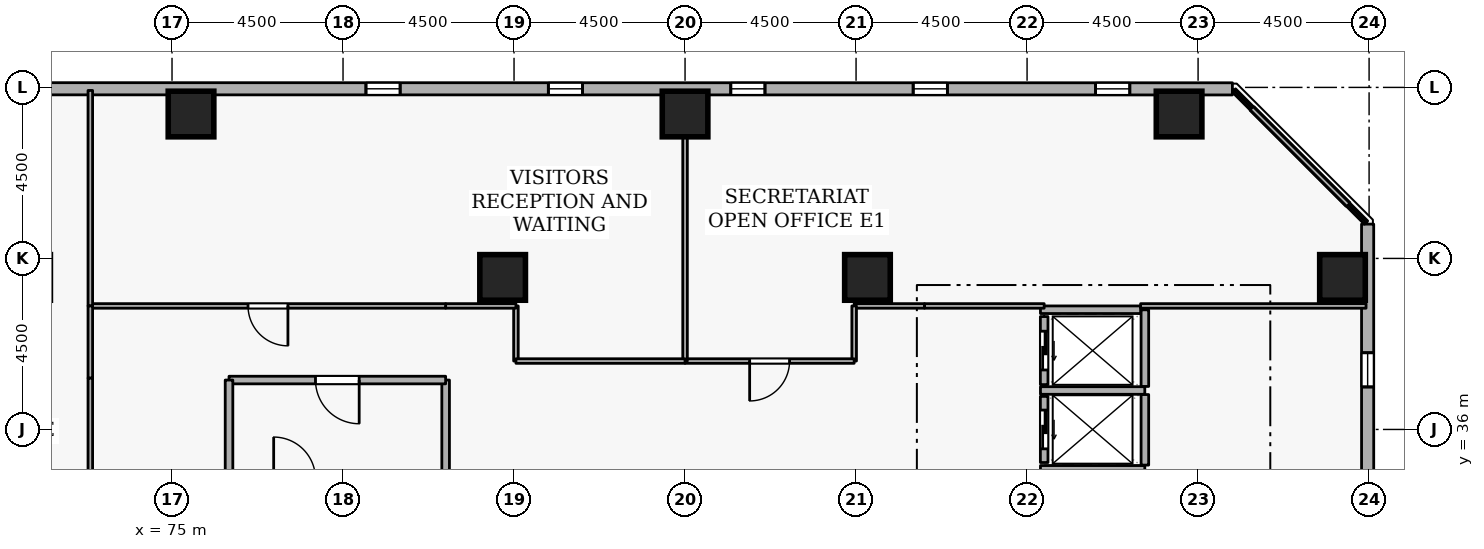
"""IFC4 building model, lengths in metres.
Left out: names, types, materials, properties, quantities, classifications, styles, units other than length and angle.
Written with IfcOpenShell. Run it as: python <this file> out.ifc"""

import sys

from ifc_helpers import new_model, si_unit, direction, frame, frame_2d, origin, origin_2d, place, context, subcontext, project, spatial, rectangle, extrude, element, fill, save


model = new_model("IFC4")
c1 = context("Model", 3, precision=1e-05, world=origin(), true_north=direction((0.0, 1.0)))
c2 = subcontext(c1, "Body", "Model", "MODEL_VIEW")
j1 = project(units=[si_unit("LENGTHUNIT", "METRE"), si_unit("PLANEANGLEUNIT", "RADIAN")], contexts=[c1])
p1 = place(None, origin())
s1 = spatial("IfcSite", under=j1, at=p1, CompositionType="ELEMENT")
p2 = place(p1, origin())
s2 = spatial("IfcBuilding", under=s1, at=p2, CompositionType="ELEMENT")
p3 = place(p2, frame((0.0, 0.0, 105.3)))
s3 = spatial("IfcBuildingStorey", under=s2, at=p3, CompositionType="ELEMENT", Elevation=105.3)
for number, where, z_axis, x_axis in (
    (1, (105.8, 40.0, 0.0), (0.0, 0.0, 1.0), (1.0, 0.0, 0.0)),
    (2, (101.5, 44.3, 0.0), (0.0, 0.0, 1.0), (1.0, 0.0, 0.0)),
    (3, (88.5, 44.3, 0.0), (0.0, 0.0, 1.0), (1.0, 0.0, 0.0)),
    (4, (75.5, 44.3, 0.0), (0.0, 0.0, 1.0), (1.0, 0.0, 0.0)),
    (5, (93.3, 40.0, 0.0), (0.0, 0.0, 1.0), (1.0, 0.0, 0.0)),
    (6, (83.7, 40.0, 0.0), (0.0, 0.0, 1.0), (1.0, 0.0, 0.0)),
):
    element("IfcColumn", number, at=place(p3, frame(where, z_axis=z_axis, x_axis=x_axis)), inside=s3, PredefinedType="COLUMN", context=c2, shape_type="SweptSolid", body=[
        extrude(rectangle(XDim=1.2, YDim=1.2, at=origin_2d()), origin(), (0.0, 0.0, 1.0), 3.6),
    ])
p4 = place(p3, frame((106.465, 5.619, 0.0), z_axis=(0.0, 0.0, 1.0), x_axis=(-8.8693006e-05, 0.999999996067, 0.0)))
e7 = element("IfcWall", 7, at=p4, inside=s3, PredefinedType="STANDARD", context=c2, shape_type="SweptSolid", body=[
    extrude(rectangle(XDim=35.784, YDim=0.32, at=frame_2d((17.892, 0.0))), origin(), (0.0, 0.0, 1.0), 2.7),
])
p5 = place(p4, frame((2.7, 0.0, 0.72)))
e8 = element("IfcOpeningElement", 8, at=p5, cuts=e7, PredefinedType="OPENING", context=c2, shape_type="SweptSolid", body=[
    extrude(rectangle(XDim=0.9, YDim=1.75, at=frame_2d((0.45, 0.875))), frame((0.0, 0.17, 0.0), z_axis=(0.0, -1.0, 0.0), x_axis=(1.0, 0.0, 0.0)), (0.0, 0.0, 1.0), 0.34),
])
p6 = place(p4, frame((12.3, 0.0, 0.72)))
e9 = element("IfcOpeningElement", 9, at=p6, cuts=e7, PredefinedType="OPENING", context=c2, shape_type="SweptSolid", body=[
    extrude(rectangle(XDim=0.9, YDim=1.75, at=frame_2d((0.45, 0.875))), frame((0.0, 0.17, 0.0), z_axis=(0.0, -1.0, 0.0), x_axis=(1.0, 0.0, 0.0)), (0.0, 0.0, 1.0), 0.34),
])
p7 = place(p4, frame((17.1, 0.0, 0.72)))
e10 = element("IfcOpeningElement", 10, at=p7, cuts=e7, PredefinedType="OPENING", context=c2, shape_type="SweptSolid", body=[
    extrude(rectangle(XDim=0.9, YDim=1.75, at=frame_2d((0.45, 0.875))), frame((0.0, 0.17, 0.0), z_axis=(0.0, -1.0, 0.0), x_axis=(1.0, 0.0, 0.0)), (0.0, 0.0, 1.0), 0.34),
])
p8 = place(p4, frame((26.7, 0.0, 0.72)))
e11 = element("IfcOpeningElement", 11, at=p8, cuts=e7, PredefinedType="OPENING", context=c2, shape_type="SweptSolid", body=[
    extrude(rectangle(XDim=0.9, YDim=1.75, at=frame_2d((0.45, 0.875))), frame((0.0, 0.17, 0.0), z_axis=(0.0, -1.0, 0.0), x_axis=(1.0, 0.0, 0.0)), (0.0, 0.0, 1.0), 0.34),
])
p9 = place(p4, frame((31.5, 0.0, 0.72)))
e12 = element("IfcOpeningElement", 12, at=p9, cuts=e7, PredefinedType="OPENING", context=c2, shape_type="SweptSolid", body=[
    extrude(rectangle(XDim=0.9, YDim=1.75, at=frame_2d((0.45, 0.875))), frame((0.0, 0.17, 0.0), z_axis=(0.0, -1.0, 0.0), x_axis=(1.0, 0.0, 0.0)), (0.0, 0.0, 1.0), 0.34),
])
p10 = place(p3, frame((102.903, 44.961, 0.0), z_axis=(0.0, 0.0, 1.0), x_axis=(-0.999999996067, 8.8693006e-05, 0.0)))
e13 = element("IfcWall", 13, at=p10, inside=s3, PredefinedType="STANDARD", context=c2, shape_type="SweptSolid", body=[
    extrude(rectangle(XDim=35.784, YDim=0.32, at=frame_2d((17.892, 0.0))), origin(), (0.0, 0.0, 1.0), 2.7),
])
p11 = place(p10, frame((2.7, 0.0, 0.72)))
e14 = element("IfcOpeningElement", 14, at=p11, cuts=e13, PredefinedType="OPENING", context=c2, shape_type="SweptSolid", body=[
    extrude(rectangle(XDim=0.9, YDim=1.75, at=frame_2d((0.45, 0.875))), frame((0.0, 0.17, 0.0), z_axis=(0.0, -1.0, 0.0), x_axis=(1.0, 0.0, 0.0)), (0.0, 0.0, 1.0), 0.34),
])
p12 = place(p10, frame((7.5, 0.0, 0.72)))
e15 = element("IfcOpeningElement", 15, at=p12, cuts=e13, PredefinedType="OPENING", context=c2, shape_type="SweptSolid", body=[
    extrude(rectangle(XDim=0.9, YDim=1.75, at=frame_2d((0.45, 0.875))), frame((0.0, 0.17, 0.0), z_axis=(0.0, -1.0, 0.0), x_axis=(1.0, 0.0, 0.0)), (0.0, 0.0, 1.0), 0.34),
])
p13 = place(p10, frame((12.3, 0.0, 0.72)))
e16 = element("IfcOpeningElement", 16, at=p13, cuts=e13, PredefinedType="OPENING", context=c2, shape_type="SweptSolid", body=[
    extrude(rectangle(XDim=0.9, YDim=1.75, at=frame_2d((0.45, 0.875))), frame((0.0, 0.17, 0.0), z_axis=(0.0, -1.0, 0.0), x_axis=(1.0, 0.0, 0.0)), (0.0, 0.0, 1.0), 0.34),
])
p14 = place(p10, frame((17.1, 0.0, 0.72)))
e17 = element("IfcOpeningElement", 17, at=p14, cuts=e13, PredefinedType="OPENING", context=c2, shape_type="SweptSolid", body=[
    extrude(rectangle(XDim=0.9, YDim=1.75, at=frame_2d((0.45, 0.875))), frame((0.0, 0.17, 0.0), z_axis=(0.0, -1.0, 0.0), x_axis=(1.0, 0.0, 0.0)), (0.0, 0.0, 1.0), 0.34),
])
p15 = place(p10, frame((21.9, 0.0, 0.72)))
e18 = element("IfcOpeningElement", 18, at=p15, cuts=e13, PredefinedType="OPENING", context=c2, shape_type="SweptSolid", body=[
    extrude(rectangle(XDim=0.9, YDim=1.75, at=frame_2d((0.45, 0.875))), frame((0.0, 0.17, 0.0), z_axis=(0.0, -1.0, 0.0), x_axis=(1.0, 0.0, 0.0)), (0.0, 0.0, 1.0), 0.34),
])
p16 = place(p10, frame((31.5, 0.0, 0.72)))
e19 = element("IfcOpeningElement", 19, at=p16, cuts=e13, PredefinedType="OPENING", context=c2, shape_type="SweptSolid", body=[
    extrude(rectangle(XDim=0.9, YDim=1.75, at=frame_2d((0.45, 0.875))), frame((0.0, 0.17, 0.0), z_axis=(0.0, -1.0, 0.0), x_axis=(1.0, 0.0, 0.0)), (0.0, 0.0, 1.0), 0.34),
])
p17 = place(p3, frame((97.95, 36.87, 0.0), z_axis=(0.0, 0.0, 1.0), x_axis=(0.0, -1.0, 0.0)))
e20 = element("IfcWall", 20, at=p17, inside=s3, PredefinedType="STANDARD", context=c2, shape_type="SweptSolid", body=[
    extrude(rectangle(XDim=1.74, YDim=0.2, at=frame_2d((0.87, 0.0))), origin(), (0.0, 0.0, 1.0), 3.34),
])
p18 = place(p17, frame((0.36, 0.0, 0.0)))
e21 = element("IfcOpeningElement", 21, at=p18, cuts=e20, PredefinedType="OPENING", context=c2, shape_type="SweptSolid", body=[
    extrude(rectangle(XDim=1.02, YDim=2.06, at=frame_2d((0.51, 1.03))), frame((0.0, 0.11, 0.0), z_axis=(0.0, -1.0, 0.0), x_axis=(1.0, 0.0, 0.0)), (0.0, 0.0, 1.0), 0.22),
])
p19 = place(p3, frame((97.95, 38.97, 0.0), z_axis=(0.0, 0.0, 1.0), x_axis=(0.0, -1.0, 0.0)))
e22 = element("IfcWall", 22, at=p19, inside=s3, PredefinedType="STANDARD", context=c2, shape_type="SweptSolid", body=[
    extrude(rectangle(XDim=1.79, YDim=0.2, at=frame_2d((0.895, 0.0))), origin(), (0.0, 0.0, 1.0), 3.34),
])
p20 = place(p19, frame((0.385, 0.0, 0.0)))
e23 = element("IfcOpeningElement", 23, at=p20, cuts=e22, PredefinedType="OPENING", context=c2, shape_type="SweptSolid", body=[
    extrude(rectangle(XDim=1.02, YDim=2.06, at=frame_2d((0.51, 1.03))), frame((0.0, 0.11, 0.0), z_axis=(0.0, -1.0, 0.0), x_axis=(1.0, 0.0, 0.0)), (0.0, 0.0, 1.0), 0.22),
])
for number, where, z_axis, x_axis in (
    (24, (97.852, 37.025, 0.0), (0.0, 0.0, 1.0), (1.0, 0.0, 0.0)),
    (25, (97.852, 34.95, 0.0), (0.0, 0.0, 1.0), (1.0, 0.0, 0.0)),
):
    element("IfcWall", number, at=place(p3, frame(where, z_axis=z_axis, x_axis=x_axis)), inside=s3, PredefinedType="STANDARD", context=c2, shape_type="SweptSolid", body=[
        extrude(rectangle(XDim=2.746, YDim=0.2, at=frame_2d((1.373, 0.0))), origin(), (0.0, 0.0, 1.0), 3.34),
    ])
p21 = place(p3, frame((100.6, 35.062, 0.0), z_axis=(0.0, 0.0, 1.0), x_axis=(0.0, 1.0, 0.0)))
e26 = element("IfcWall", 26, at=p21, inside=s3, PredefinedType="STANDARD", context=c2, shape_type="SweptSolid", body=[
    extrude(rectangle(XDim=1.856, YDim=0.2, at=frame_2d((0.928, 0.0))), origin(), (0.0, 0.0, 1.0), 3.34),
])
p22 = place(p3, frame((100.6, 37.132, 0.0), z_axis=(0.0, 0.0, 1.0), x_axis=(0.0, 1.0, 0.0)))
e27 = element("IfcWall", 27, at=p22, inside=s3, PredefinedType="STANDARD", context=c2, shape_type="SweptSolid", body=[
    extrude(rectangle(XDim=2.016, YDim=0.2, at=frame_2d((1.008, 0.0))), origin(), (0.0, 0.0, 1.0), 3.34),
])
p23 = place(p3, frame((97.852, 39.15, 0.0), z_axis=(0.0, 0.0, 1.0), x_axis=(1.0, 0.0, 0.0)))
e28 = element("IfcWall", 28, at=p23, inside=s3, PredefinedType="STANDARD", context=c2, shape_type="SweptSolid", body=[
    extrude(rectangle(XDim=2.636, YDim=0.2, at=frame_2d((1.318, 0.0))), origin(), (0.0, 0.0, 1.0), 3.34),
])
p24 = place(p3, frame((82.2, 34.8, 0.0), z_axis=(0.0, 0.0, 1.0), x_axis=(0.0, 1.0, 0.0)))
e29 = element("IfcWall", 29, at=p24, inside=s3, PredefinedType="STANDARD", context=c2, shape_type="SweptSolid", body=[
    extrude(rectangle(XDim=2.5, YDim=0.2, at=frame_2d((1.25, 0.0))), origin(), (0.0, 0.0, 1.0), 3.34),
])
p25 = place(p3, frame((82.2, 37.3, 0.0), z_axis=(0.0, 0.0, 1.0), x_axis=(-1.0, 0.0, 0.0)))
e30 = element("IfcWall", 30, at=p25, inside=s3, PredefinedType="STANDARD", context=c2, shape_type="SweptSolid", body=[
    extrude(rectangle(XDim=5.7, YDim=0.2, at=frame_2d((2.85, 0.0))), origin(), (0.0, 0.0, 1.0), 3.34),
])
p26 = place(p25, frame((2.275, 0.0, 0.0)))
e31 = element("IfcOpeningElement", 31, at=p26, cuts=e30, PredefinedType="OPENING", context=c2, shape_type="SweptSolid", body=[
    extrude(rectangle(XDim=1.15, YDim=2.1, at=frame_2d((0.575, 1.05))), frame((0.0, 0.11, 0.0), z_axis=(0.0, -1.0, 0.0), x_axis=(1.0, 0.0, 0.0)), (0.0, 0.0, 1.0), 0.22),
])
p27 = place(p3, frame((76.5, 37.3, 0.0), z_axis=(0.0, 0.0, 1.0), x_axis=(0.0, -1.0, 0.0)))
e32 = element("IfcWall", 32, at=p27, inside=s3, PredefinedType="STANDARD", context=c2, shape_type="SweptSolid", body=[
    extrude(rectangle(XDim=2.5, YDim=0.2, at=frame_2d((1.25, 0.0))), origin(), (0.0, 0.0, 1.0), 3.34),
])
p28 = place(p3, frame((106.42, 39.25, 0.0), z_axis=(0.0, 0.0, 1.0), x_axis=(-1.0, 0.0, 0.0)))
e33 = element("IfcWall", 33, at=p28, inside=s3, PredefinedType="PARTITIONING", context=c2, shape_type="SweptSolid", body=[
    extrude(rectangle(XDim=5.932, YDim=0.12, at=frame_2d((2.966, 0.0))), origin(), (0.0, 0.0, 1.0), 3.34),
])
p29 = place(p3, frame((97.95, 39.25, 0.0), z_axis=(0.0, 0.0, 1.0), x_axis=(-1.0, 0.0, 0.0)))
e34 = element("IfcWall", 34, at=p29, inside=s3, PredefinedType="PARTITIONING", context=c2, shape_type="SweptSolid", body=[
    extrude(rectangle(XDim=3.15, YDim=0.12, at=frame_2d((1.575, 0.0))), origin(), (0.0, 0.0, 1.0), 3.34),
])
p30 = place(p3, frame((94.8, 39.25, 0.0), z_axis=(0.0, 0.0, 1.0), x_axis=(-1.0, 0.0, 0.0)))
e35 = element("IfcWall", 35, at=p30, inside=s3, PredefinedType="PARTITIONING", context=c2, shape_type="SweptSolid", body=[
    extrude(rectangle(XDim=1.85, YDim=0.12, at=frame_2d((0.925, 0.0))), origin(), (0.0, 0.0, 1.0), 3.34),
])
p31 = place(p3, frame((92.95, 39.25, 0.0), z_axis=(0.0, 0.0, 1.0), x_axis=(0.0, -1.0, 0.0)))
e36 = element("IfcWall", 36, at=p31, inside=s3, PredefinedType="PARTITIONING", context=c2, shape_type="SweptSolid", body=[
    extrude(rectangle(XDim=1.45, YDim=0.12, at=frame_2d((0.725, 0.0))), origin(), (0.0, 0.0, 1.0), 3.34),
])
p32 = place(p3, frame((92.95, 37.8, 0.0), z_axis=(0.0, 0.0, 1.0), x_axis=(-1.0, 0.0, 0.0)))
e37 = element("IfcWall", 37, at=p32, inside=s3, PredefinedType="PARTITIONING", context=c2, shape_type="SweptSolid", body=[
    extrude(rectangle(XDim=4.45, YDim=0.12, at=frame_2d((2.225, 0.0))), origin(), (0.0, 0.0, 1.0), 3.34),
])
p33 = place(p32, frame((1.7, 0.0, 0.0)))
e38 = element("IfcOpeningElement", 38, at=p33, cuts=e37, PredefinedType="OPENING", context=c2, shape_type="SweptSolid", body=[
    extrude(rectangle(XDim=1.05, YDim=2.1, at=frame_2d((0.525, 1.05))), frame((0.0, 0.07, 0.0), z_axis=(0.0, -1.0, 0.0), x_axis=(1.0, 0.0, 0.0)), (0.0, 0.0, 1.0), 0.14),
])
p34 = place(p3, frame((88.5, 37.8, 0.0), z_axis=(0.0, 0.0, 1.0), x_axis=(0.0, 1.0, 0.0)))
e39 = element("IfcWall", 39, at=p34, inside=s3, PredefinedType="PARTITIONING", context=c2, shape_type="SweptSolid", body=[
    extrude(rectangle(XDim=7.12, YDim=0.12, at=frame_2d((3.56, 0.0))), origin(), (0.0, 0.0, 1.0), 2.878),
])
p35 = place(p3, frame((102.943, 44.92, 0.0), z_axis=(0.0, 0.0, 1.0), x_axis=(0.707106781187, -0.707106781187, 0.0)))
e40 = element("IfcWall", 40, at=p35, inside=s3, PredefinedType="PARTITIONING", context=c2, shape_type="SweptSolid", body=[
    extrude(rectangle(XDim=4.917, YDim=0.12, at=frame_2d((2.458, 0.0))), origin(), (0.0, 0.0, 1.0), 3.34),
])
p36 = place(p3, frame((84.05, 37.8, 0.0), z_axis=(0.0, 0.0, 1.0), x_axis=(0.0, 1.0, 0.0)))
e41 = element("IfcWall", 41, at=p36, inside=s3, PredefinedType="PARTITIONING", context=c2, shape_type="SweptSolid", body=[
    extrude(rectangle(XDim=1.45, YDim=0.12, at=frame_2d((0.725, 0.0))), origin(), (0.0, 0.0, 1.0), 3.34),
])
p37 = place(p3, frame((84.05, 39.25, 0.0), z_axis=(0.0, 0.0, 1.0), x_axis=(-1.0, 0.0, 0.0)))
e42 = element("IfcWall", 42, at=p37, inside=s3, PredefinedType="PARTITIONING", context=c2, shape_type="SweptSolid", body=[
    extrude(rectangle(XDim=1.85, YDim=0.12, at=frame_2d((0.925, 0.0))), origin(), (0.0, 0.0, 1.0), 3.34),
])
p38 = place(p3, frame((82.2, 39.25, 0.0), z_axis=(0.0, 0.0, 1.0), x_axis=(-1.0, 0.0, 0.0)))
e43 = element("IfcWall", 43, at=p38, inside=s3, PredefinedType="PARTITIONING", context=c2, shape_type="SweptSolid", body=[
    extrude(rectangle(XDim=9.35, YDim=0.12, at=frame_2d((4.675, 0.0))), origin(), (0.0, 0.0, 1.0), 3.34),
])
p39 = place(p38, frame((4.15, 0.0, 0.0)))
e44 = element("IfcOpeningElement", 44, at=p39, cuts=e43, PredefinedType="OPENING", context=c2, shape_type="SweptSolid", body=[
    extrude(rectangle(XDim=1.05, YDim=2.1, at=frame_2d((0.525, 1.05))), frame((0.0, 0.07, 0.0), z_axis=(0.0, -1.0, 0.0), x_axis=(1.0, 0.0, 0.0)), (0.0, 0.0, 1.0), 0.14),
])
p40 = place(p3, frame((72.85, 39.25, 0.0), z_axis=(0.0, 0.0, 1.0), x_axis=(0.0, 1.0, 0.0)))
e45 = element("IfcWall", 45, at=p40, inside=s3, PredefinedType="PARTITIONING", context=c2, shape_type="SweptSolid", body=[
    extrude(rectangle(XDim=5.67, YDim=0.12, at=frame_2d((2.835, 0.0))), origin(), (0.0, 0.0, 1.0), 3.34),
])
p41 = place(p3, frame((88.5, 37.8, 0.0), z_axis=(0.0, 0.0, 1.0), x_axis=(-1.0, 0.0, 0.0)))
e46 = element("IfcWall", 46, at=p41, inside=s3, PredefinedType="PARTITIONING", context=c2, shape_type="SweptSolid", body=[
    extrude(rectangle(XDim=4.45, YDim=0.12, at=frame_2d((2.225, 0.0))), origin(), (0.0, 0.0, 1.0), 3.34),
])
p42 = place(p3, frame((72.85, 39.25, 0.0), z_axis=(0.0, 0.0, 1.0), x_axis=(0.0, -1.0, 0.0)))
e47 = element("IfcWall", 47, at=p42, inside=s3, PredefinedType="PARTITIONING", context=c2, shape_type="SweptSolid", body=[
    extrude(rectangle(XDim=1.9, YDim=0.12, at=frame_2d((0.95, 0.0))), origin(), (0.0, 0.0, 1.0), 3.34),
])
p43 = place(p3, frame((72.85, 37.35, 0.0), z_axis=(0.0, 0.0, 1.0), x_axis=(0.0, -1.0, 0.0)))
e48 = element("IfcWall", 48, at=p43, inside=s3, PredefinedType="PARTITIONING", context=c2, shape_type="SweptSolid", body=[
    extrude(rectangle(XDim=10.35, YDim=0.12, at=frame_2d((5.175, 0.0))), origin(), (0.0, 0.0, 1.0), 2.895),
])
p44 = place(p43, frame((4.65, 0.0, 0.0)))
e49 = element("IfcOpeningElement", 49, at=p44, cuts=e48, PredefinedType="OPENING", context=c2, shape_type="SweptSolid", body=[
    extrude(rectangle(XDim=1.05, YDim=2.1, at=frame_2d((0.525, 1.05))), frame((0.0, 0.07, 0.0), z_axis=(0.0, -1.0, 0.0), x_axis=(1.0, 0.0, 0.0)), (0.0, 0.0, 1.0), 0.14),
])
p45 = place(p9, origin())
e50 = element("IfcWindow", 50, at=p45, inside=s3, PartitioningType="SINGLE_PANEL", PredefinedType="WINDOW", context=c2, shape_type="SweptSolid", body=[
    extrude(rectangle(XDim=0.9, YDim=1.75, at=frame_2d((0.45, 0.875))), frame((0.0, 0.03, 0.0), z_axis=(0.0, -1.0, 0.0), x_axis=(1.0, 0.0, 0.0)), (0.0, 0.0, 1.0), 0.06),
])
fill(e12, e50)
p46 = place(p11, origin())
e51 = element("IfcWindow", 51, at=p46, inside=s3, PartitioningType="SINGLE_PANEL", PredefinedType="WINDOW", context=c2, shape_type="SweptSolid", body=[
    extrude(rectangle(XDim=0.9, YDim=1.75, at=frame_2d((0.45, 0.875))), frame((0.0, 0.03, 0.0), z_axis=(0.0, -1.0, 0.0), x_axis=(1.0, 0.0, 0.0)), (0.0, 0.0, 1.0), 0.06),
])
fill(e14, e51)
p47 = place(p12, origin())
e52 = element("IfcWindow", 52, at=p47, inside=s3, PartitioningType="SINGLE_PANEL", PredefinedType="WINDOW", context=c2, shape_type="SweptSolid", body=[
    extrude(rectangle(XDim=0.9, YDim=1.75, at=frame_2d((0.45, 0.875))), frame((0.0, 0.03, 0.0), z_axis=(0.0, -1.0, 0.0), x_axis=(1.0, 0.0, 0.0)), (0.0, 0.0, 1.0), 0.06),
])
fill(e15, e52)
p48 = place(p13, origin())
e53 = element("IfcWindow", 53, at=p48, inside=s3, PartitioningType="SINGLE_PANEL", PredefinedType="WINDOW", context=c2, shape_type="SweptSolid", body=[
    extrude(rectangle(XDim=0.9, YDim=1.75, at=frame_2d((0.45, 0.875))), frame((0.0, 0.03, 0.0), z_axis=(0.0, -1.0, 0.0), x_axis=(1.0, 0.0, 0.0)), (0.0, 0.0, 1.0), 0.06),
])
fill(e16, e53)
p49 = place(p14, origin())
e54 = element("IfcWindow", 54, at=p49, inside=s3, PartitioningType="SINGLE_PANEL", PredefinedType="WINDOW", context=c2, shape_type="SweptSolid", body=[
    extrude(rectangle(XDim=0.9, YDim=1.75, at=frame_2d((0.45, 0.875))), frame((0.0, 0.03, 0.0), z_axis=(0.0, -1.0, 0.0), x_axis=(1.0, 0.0, 0.0)), (0.0, 0.0, 1.0), 0.06),
])
fill(e17, e54)
p50 = place(p15, origin())
e55 = element("IfcWindow", 55, at=p50, inside=s3, PartitioningType="SINGLE_PANEL", PredefinedType="WINDOW", context=c2, shape_type="SweptSolid", body=[
    extrude(rectangle(XDim=0.9, YDim=1.75, at=frame_2d((0.45, 0.875))), frame((0.0, 0.03, 0.0), z_axis=(0.0, -1.0, 0.0), x_axis=(1.0, 0.0, 0.0)), (0.0, 0.0, 1.0), 0.06),
])
fill(e18, e55)
p51 = place(p18, origin())
e56 = element("IfcDoor", 56, at=p51, inside=s3, OperationType="SLIDING_TO_LEFT", PredefinedType="DOOR", context=c2, shape_type="SweptSolid", body=[
    extrude(rectangle(XDim=1.02, YDim=2.06, at=frame_2d((0.51, 1.03))), frame((0.0, 0.025, 0.0), z_axis=(0.0, -1.0, 0.0), x_axis=(1.0, 0.0, 0.0)), (0.0, 0.0, 1.0), 0.05),
])
fill(e21, e56)
p52 = place(p20, origin())
e57 = element("IfcDoor", 57, at=p52, inside=s3, OperationType="SLIDING_TO_LEFT", PredefinedType="DOOR", context=c2, shape_type="SweptSolid", body=[
    extrude(rectangle(XDim=1.02, YDim=2.06, at=frame_2d((0.51, 1.03))), frame((0.0, 0.025, 0.0), z_axis=(0.0, -1.0, 0.0), x_axis=(1.0, 0.0, 0.0)), (0.0, 0.0, 1.0), 0.05),
])
fill(e23, e57)
p53 = place(p26, origin())
e58 = element("IfcDoor", 58, at=p53, inside=s3, OperationType="SINGLE_SWING_LEFT", PredefinedType="DOOR", context=c2, shape_type="SweptSolid", body=[
    extrude(rectangle(XDim=1.15, YDim=2.1, at=frame_2d((0.575, 1.05))), frame((0.0, 0.025, 0.0), z_axis=(0.0, -1.0, 0.0), x_axis=(1.0, 0.0, 0.0)), (0.0, 0.0, 1.0), 0.05),
])
fill(e31, e58)
p54 = place(p33, origin())
e59 = element("IfcDoor", 59, at=p54, inside=s3, OperationType="SINGLE_SWING_RIGHT", PredefinedType="DOOR", context=c2, shape_type="SweptSolid", body=[
    extrude(rectangle(XDim=1.05, YDim=2.1, at=frame_2d((0.525, 1.05))), frame((0.0, 0.025, 0.0), z_axis=(0.0, -1.0, 0.0), x_axis=(1.0, 0.0, 0.0)), (0.0, 0.0, 1.0), 0.05),
])
fill(e38, e59)
p55 = place(p39, origin())
e60 = element("IfcDoor", 60, at=p55, inside=s3, OperationType="SINGLE_SWING_LEFT", PredefinedType="DOOR", context=c2, shape_type="SweptSolid", body=[
    extrude(rectangle(XDim=1.05, YDim=2.1, at=frame_2d((0.525, 1.05))), frame((0.0, 0.025, 0.0), z_axis=(0.0, -1.0, 0.0), x_axis=(1.0, 0.0, 0.0)), (0.0, 0.0, 1.0), 0.05),
])
fill(e44, e60)
save(model, sys.argv[1])
